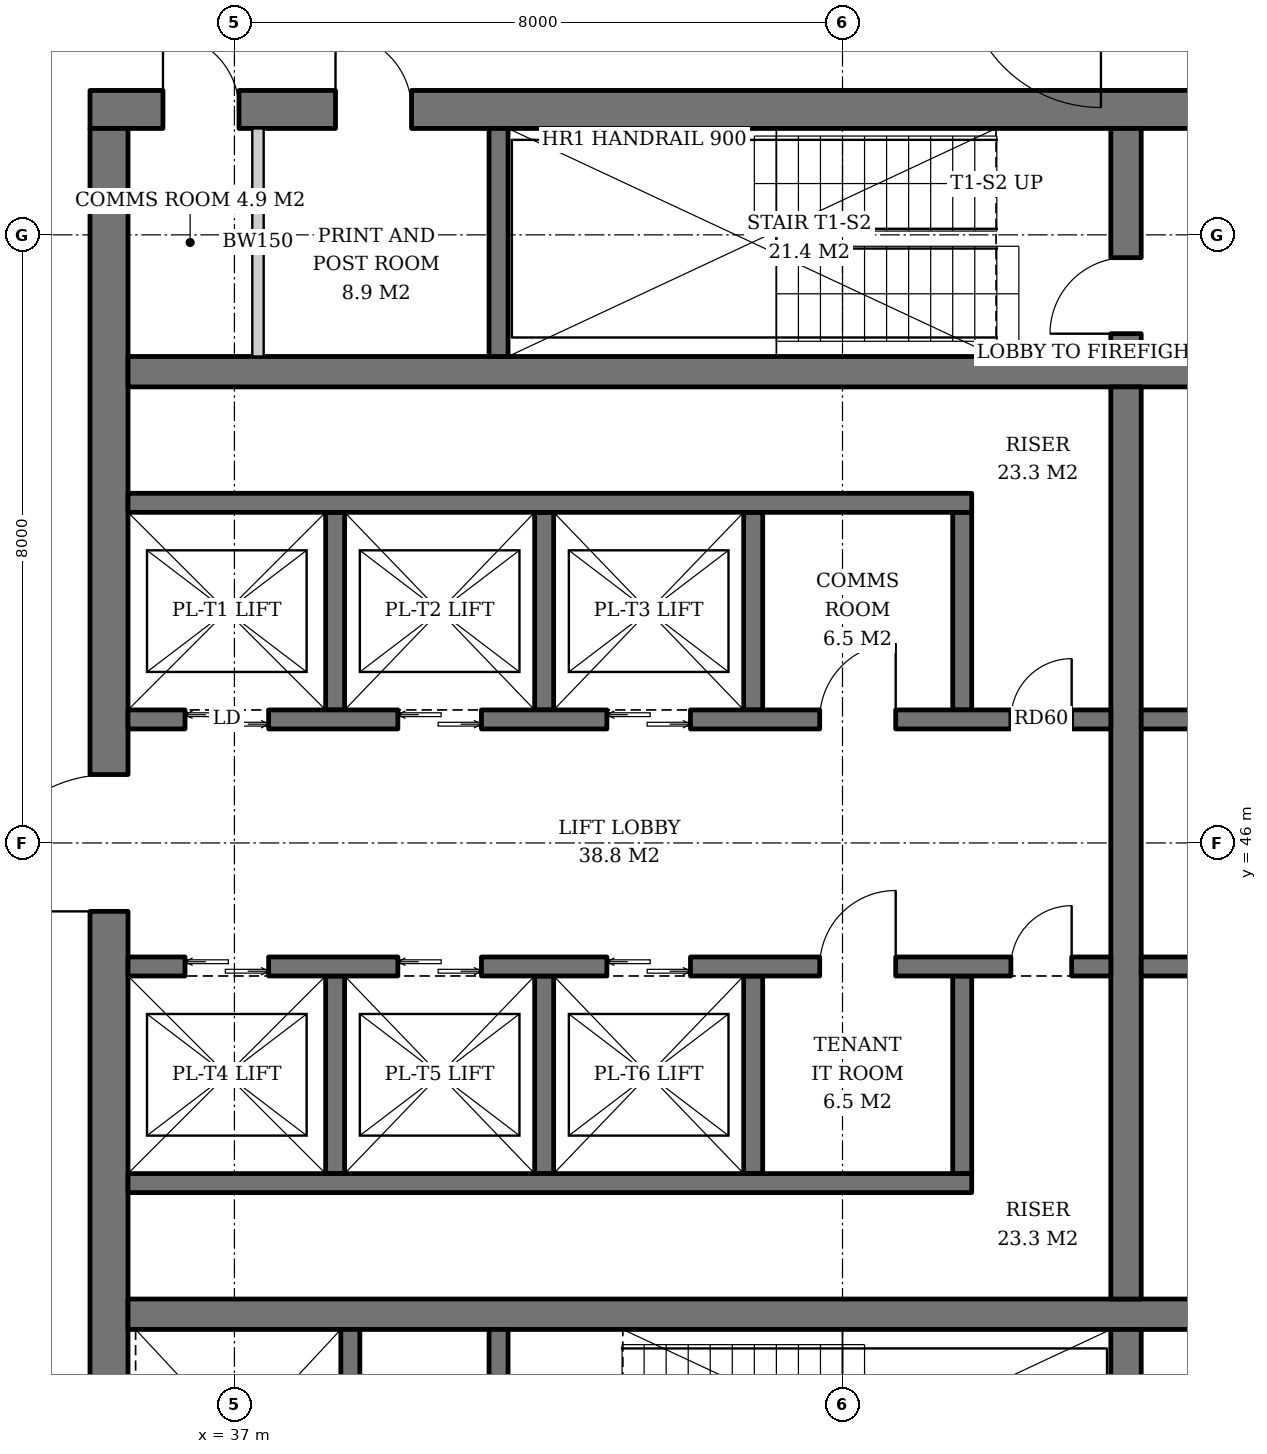
"""IFC4 building model, lengths in metres.
Left out: names, types, materials, properties, quantities, classifications, styles, units other than length and angle.
Written with IfcOpenShell. Run it as: python <this file> out.ifc"""

import sys

from ifc_helpers import new_model, si_unit, direction, frame, frame_2d, origin, place, context, subcontext, project, spatial, rectangle, extrude, element, fill, save


model = new_model("IFC4")
c1 = context("Model", 3, precision=1e-05, world=origin(), true_north=direction((0.0, 1.0)))
c2 = subcontext(c1, "Body", "Model", "MODEL_VIEW")
j1 = project(units=[si_unit("LENGTHUNIT", "METRE"), si_unit("PLANEANGLEUNIT", "RADIAN")], contexts=[c1])
p1 = place(None, origin())
s1 = spatial("IfcSite", under=j1, at=p1, CompositionType="ELEMENT")
p2 = place(p1, origin())
s2 = spatial("IfcBuilding", under=s1, at=p2, CompositionType="ELEMENT")
p3 = place(p2, frame((0.0, 0.0, 245.2)))
s3 = spatial("IfcBuildingStorey", under=s2, at=p3, CompositionType="ELEMENT", Elevation=245.2)
p4 = place(p3, frame((35.1, 55.65, 0.0), z_axis=(0.0, 0.0, 1.0), x_axis=(1.0, 0.0, 0.0)))
e1 = element("IfcWall", 1, at=p4, inside=s3, PredefinedType="SHEAR", context=c2, shape_type="SweptSolid", body=[
    extrude(rectangle(XDim=19.8, YDim=0.5, at=frame_2d((9.9, 0.0))), origin(), (0.0, 0.0, 1.0), 3.8),
])
p5 = place(p4, frame((14.54, 0.0, 0.0)))
e2 = element("IfcOpeningElement", 2, at=p5, cuts=e1, PredefinedType="OPENING", context=c2, shape_type="SweptSolid", body=[
    extrude(rectangle(XDim=1.0, YDim=2.1, at=frame_2d((0.5, 1.05))), frame((0.0, 0.26, 0.0), z_axis=(0.0, -1.0, 0.0), x_axis=(1.0, 0.0, 0.0)), (0.0, 0.0, 1.0), 0.52),
])
p6 = place(p4, frame((0.96, 0.0, 0.0)))
e3 = element("IfcOpeningElement", 3, at=p6, cuts=e1, PredefinedType="OPENING", context=c2, shape_type="SweptSolid", body=[
    extrude(rectangle(XDim=1.0, YDim=2.1, at=frame_2d((0.5, 1.05))), frame((0.0, 0.26, 0.0), z_axis=(0.0, -1.0, 0.0), x_axis=(1.0, 0.0, 0.0)), (0.0, 0.0, 1.0), 0.52),
])
p7 = place(p4, frame((3.23, 0.0, 0.0)))
e4 = element("IfcOpeningElement", 4, at=p7, cuts=e1, PredefinedType="OPENING", context=c2, shape_type="SweptSolid", body=[
    extrude(rectangle(XDim=1.0, YDim=2.1, at=frame_2d((0.5, 1.05))), frame((0.0, 0.26, 0.0), z_axis=(0.0, -1.0, 0.0), x_axis=(1.0, 0.0, 0.0)), (0.0, 0.0, 1.0), 0.52),
])
p8 = place(p3, frame((35.35, 36.6, 0.0), z_axis=(0.0, 0.0, 1.0), x_axis=(0.0, 1.0, 0.0)))
e5 = element("IfcWall", 5, at=p8, inside=s3, PredefinedType="SHEAR", context=c2, shape_type="SweptSolid", body=[
    extrude(rectangle(XDim=18.8, YDim=0.5, at=frame_2d((9.4, 0.0))), origin(), (0.0, 0.0, 1.0), 3.8),
])
p9 = place(p8, frame((8.5, 0.0, 0.0)))
e6 = element("IfcOpeningElement", 6, at=p9, cuts=e5, PredefinedType="OPENING", context=c2, shape_type="SweptSolid", body=[
    extrude(rectangle(XDim=1.8, YDim=2.4, at=frame_2d((0.9, 1.2))), frame((0.0, 0.26, 0.0), z_axis=(0.0, -1.0, 0.0), x_axis=(1.0, 0.0, 0.0)), (0.0, 0.0, 1.0), 0.52),
])
for number, where, z_axis, x_axis in (
    (7, (35.6, 39.8, 0.0), (0.0, 0.0, 1.0), (1.0, 0.0, 0.0)),
    (8, (35.6, 52.2, 0.0), (0.0, 0.0, 1.0), (1.0, 0.0, 0.0)),
):
    element("IfcWall", number, at=place(p3, frame(where, z_axis=z_axis, x_axis=x_axis)), inside=s3, PredefinedType="SHEAR", context=c2, shape_type="SweptSolid", body=[
        extrude(rectangle(XDim=18.8, YDim=0.4, at=frame_2d((9.4, 0.0))), origin(), (0.0, 0.0, 1.0), 3.8),
    ])
p10 = place(p3, frame((48.73, 36.6, 0.0), z_axis=(0.0, 0.0, 1.0), x_axis=(0.0, 1.0, 0.0)))
e9 = element("IfcWall", 9, at=p10, inside=s3, PredefinedType="SHEAR", context=c2, shape_type="SweptSolid", body=[
    extrude(rectangle(XDim=3.0, YDim=0.4, at=frame_2d((1.5, 0.0))), origin(), (0.0, 0.0, 1.0), 3.8),
])
p11 = place(p3, frame((48.73, 40.0, 0.0), z_axis=(0.0, 0.0, 1.0), x_axis=(0.0, 1.0, 0.0)))
e10 = element("IfcWall", 10, at=p11, inside=s3, PredefinedType="SHEAR", context=c2, shape_type="SweptSolid", body=[
    extrude(rectangle(XDim=12.0, YDim=0.4, at=frame_2d((6.0, 0.0))), origin(), (0.0, 0.0, 1.0), 3.8),
])
p12 = place(p3, frame((48.73, 52.4, 0.0), z_axis=(0.0, 0.0, 1.0), x_axis=(0.0, 1.0, 0.0)))
e11 = element("IfcWall", 11, at=p12, inside=s3, PredefinedType="SHEAR", context=c2, shape_type="SweptSolid", body=[
    extrude(rectangle(XDim=3.0, YDim=0.4, at=frame_2d((1.5, 0.0))), origin(), (0.0, 0.0, 1.0), 3.8),
])
p13 = place(p12, frame((0.3, 0.0, 0.0)))
e12 = element("IfcOpeningElement", 12, at=p13, cuts=e11, PredefinedType="OPENING", context=c2, shape_type="SweptSolid", body=[
    extrude(rectangle(XDim=1.0, YDim=2.1, at=frame_2d((0.5, 1.05))), frame((0.0, 0.21, 0.0), z_axis=(0.0, -1.0, 0.0), x_axis=(1.0, 0.0, 0.0)), (0.0, 0.0, 1.0), 0.42),
])
p14 = place(p3, frame((38.525, 36.6, 0.0), z_axis=(0.0, 0.0, 1.0), x_axis=(0.0, 1.0, 0.0)))
e13 = element("IfcWall", 13, at=p14, inside=s3, PredefinedType="SHEAR", context=c2, shape_type="SweptSolid", body=[
    extrude(rectangle(XDim=3.0, YDim=0.25, at=frame_2d((1.5, 0.0))), origin(), (0.0, 0.0, 1.0), 3.8),
])
p15 = place(p14, frame((0.9, 0.0, 0.0)))
e14 = element("IfcOpeningElement", 14, at=p15, cuts=e13, PredefinedType="OPENING", context=c2, shape_type="SweptSolid", body=[
    extrude(rectangle(XDim=1.3, YDim=2.2, at=frame_2d((0.65, 1.1))), frame((0.0, 0.135, 0.0), z_axis=(0.0, -1.0, 0.0), x_axis=(1.0, 0.0, 0.0)), (0.0, 0.0, 1.0), 0.27),
])
p16 = place(p3, frame((40.475, 36.6, 0.0), z_axis=(0.0, 0.0, 1.0), x_axis=(0.0, 1.0, 0.0)))
e15 = element("IfcWall", 15, at=p16, inside=s3, PredefinedType="SHEAR", context=c2, shape_type="SweptSolid", body=[
    extrude(rectangle(XDim=3.0, YDim=0.25, at=frame_2d((1.5, 0.0))), origin(), (0.0, 0.0, 1.0), 3.8),
])
p17 = place(p16, frame((0.85, 0.0, 0.0)))
e16 = element("IfcOpeningElement", 16, at=p17, cuts=e15, PredefinedType="OPENING", context=c2, shape_type="SweptSolid", body=[
    extrude(rectangle(XDim=1.2, YDim=2.1, at=frame_2d((0.6, 1.05))), frame((0.0, 0.135, 0.0), z_axis=(0.0, -1.0, 0.0), x_axis=(1.0, 0.0, 0.0)), (0.0, 0.0, 1.0), 0.27),
])
p18 = place(p3, frame((40.475, 52.4, 0.0), z_axis=(0.0, 0.0, 1.0), x_axis=(0.0, 1.0, 0.0)))
e17 = element("IfcWall", 17, at=p18, inside=s3, PredefinedType="SHEAR", context=c2, shape_type="SweptSolid", body=[
    extrude(rectangle(XDim=3.0, YDim=0.25, at=frame_2d((1.5, 0.0))), origin(), (0.0, 0.0, 1.0), 3.8),
])
for number, where, z_axis, x_axis in (
    (18, (38.325, 47.75, 0.0), (0.0, 0.0, 1.0), (0.0, 1.0, 0.0)),
    (19, (41.075, 47.75, 0.0), (0.0, 0.0, 1.0), (0.0, 1.0, 0.0)),
    (20, (43.825, 47.75, 0.0), (0.0, 0.0, 1.0), (0.0, 1.0, 0.0)),
    (21, (46.575, 47.75, 0.0), (0.0, 0.0, 1.0), (0.0, 1.0, 0.0)),
):
    element("IfcWall", number, at=place(p3, frame(where, z_axis=z_axis, x_axis=x_axis)), inside=s3, PredefinedType="SHEAR", context=c2, shape_type="SweptSolid", body=[
        extrude(rectangle(XDim=2.6, YDim=0.25, at=frame_2d((1.3, 0.0))), origin(), (0.0, 0.0, 1.0), 3.8),
    ])
p19 = place(p3, frame((35.6, 50.475, 0.0), z_axis=(0.0, 0.0, 1.0), x_axis=(1.0, 0.0, 0.0)))
e22 = element("IfcWall", 22, at=p19, inside=s3, PredefinedType="SHEAR", context=c2, shape_type="SweptSolid", body=[
    extrude(rectangle(XDim=11.1, YDim=0.25, at=frame_2d((5.55, 0.0))), origin(), (0.0, 0.0, 1.0), 3.8),
])
p20 = place(p3, frame((35.6, 47.625, 0.0), z_axis=(0.0, 0.0, 1.0), x_axis=(1.0, 0.0, 0.0)))
e23 = element("IfcWall", 23, at=p20, inside=s3, PredefinedType="SHEAR", context=c2, shape_type="SweptSolid", body=[
    extrude(rectangle(XDim=12.93, YDim=0.25, at=frame_2d((6.465, 0.0))), origin(), (0.0, 0.0, 1.0), 3.8),
])
p21 = place(p20, frame((0.75, 0.0, 0.0)))
e24 = element("IfcOpeningElement", 24, at=p21, cuts=e23, PredefinedType="OPENING", context=c2, shape_type="SweptSolid", body=[
    extrude(rectangle(XDim=1.1, YDim=2.2, at=frame_2d((0.55, 1.1))), frame((0.0, 0.135, 0.0), z_axis=(0.0, -1.0, 0.0), x_axis=(1.0, 0.0, 0.0)), (0.0, 0.0, 1.0), 0.27),
])
p22 = place(p20, frame((3.55, 0.0, 0.0)))
e25 = element("IfcOpeningElement", 25, at=p22, cuts=e23, PredefinedType="OPENING", context=c2, shape_type="SweptSolid", body=[
    extrude(rectangle(XDim=1.1, YDim=2.2, at=frame_2d((0.55, 1.1))), frame((0.0, 0.135, 0.0), z_axis=(0.0, -1.0, 0.0), x_axis=(1.0, 0.0, 0.0)), (0.0, 0.0, 1.0), 0.27),
])
p23 = place(p20, frame((6.3, 0.0, 0.0)))
e26 = element("IfcOpeningElement", 26, at=p23, cuts=e23, PredefinedType="OPENING", context=c2, shape_type="SweptSolid", body=[
    extrude(rectangle(XDim=1.1, YDim=2.2, at=frame_2d((0.55, 1.1))), frame((0.0, 0.135, 0.0), z_axis=(0.0, -1.0, 0.0), x_axis=(1.0, 0.0, 0.0)), (0.0, 0.0, 1.0), 0.27),
])
p24 = place(p20, frame((9.1, 0.0, 0.0)))
e27 = element("IfcOpeningElement", 27, at=p24, cuts=e23, PredefinedType="OPENING", context=c2, shape_type="SweptSolid", body=[
    extrude(rectangle(XDim=1.0, YDim=2.1, at=frame_2d((0.5, 1.05))), frame((0.0, 0.135, 0.0), z_axis=(0.0, -1.0, 0.0), x_axis=(1.0, 0.0, 0.0)), (0.0, 0.0, 1.0), 0.27),
])
p25 = place(p20, frame((11.615, 0.0, 0.0)))
e28 = element("IfcOpeningElement", 28, at=p25, cuts=e23, PredefinedType="OPENING", context=c2, shape_type="SweptSolid", body=[
    extrude(rectangle(XDim=0.8, YDim=2.0, at=frame_2d((0.4, 1.0))), frame((0.0, 0.135, 0.0), z_axis=(0.0, -1.0, 0.0), x_axis=(1.0, 0.0, 0.0)), (0.0, 0.0, 1.0), 0.27),
])
for number, where, z_axis, x_axis in (
    (29, (38.325, 44.25, 0.0), (0.0, 0.0, 1.0), (0.0, -1.0, 0.0)),
    (30, (41.075, 44.25, 0.0), (0.0, 0.0, 1.0), (0.0, -1.0, 0.0)),
    (31, (43.825, 44.25, 0.0), (0.0, 0.0, 1.0), (0.0, -1.0, 0.0)),
    (32, (46.575, 44.25, 0.0), (0.0, 0.0, 1.0), (0.0, -1.0, 0.0)),
):
    element("IfcWall", number, at=place(p3, frame(where, z_axis=z_axis, x_axis=x_axis)), inside=s3, PredefinedType="SHEAR", context=c2, shape_type="SweptSolid", body=[
        extrude(rectangle(XDim=2.6, YDim=0.25, at=frame_2d((1.3, 0.0))), origin(), (0.0, 0.0, 1.0), 3.8),
    ])
p26 = place(p3, frame((35.6, 41.525, 0.0), z_axis=(0.0, 0.0, 1.0), x_axis=(1.0, 0.0, 0.0)))
e33 = element("IfcWall", 33, at=p26, inside=s3, PredefinedType="SHEAR", context=c2, shape_type="SweptSolid", body=[
    extrude(rectangle(XDim=11.1, YDim=0.25, at=frame_2d((5.55, 0.0))), origin(), (0.0, 0.0, 1.0), 3.8),
])
p27 = place(p3, frame((35.6, 44.375, 0.0), z_axis=(0.0, 0.0, 1.0), x_axis=(1.0, 0.0, 0.0)))
e34 = element("IfcWall", 34, at=p27, inside=s3, PredefinedType="SHEAR", context=c2, shape_type="SweptSolid", body=[
    extrude(rectangle(XDim=12.93, YDim=0.25, at=frame_2d((6.465, 0.0))), origin(), (0.0, 0.0, 1.0), 3.8),
])
p28 = place(p27, frame((0.75, 0.0, 0.0)))
e35 = element("IfcOpeningElement", 35, at=p28, cuts=e34, PredefinedType="OPENING", context=c2, shape_type="SweptSolid", body=[
    extrude(rectangle(XDim=1.1, YDim=2.2, at=frame_2d((0.55, 1.1))), frame((0.0, 0.135, 0.0), z_axis=(0.0, -1.0, 0.0), x_axis=(1.0, 0.0, 0.0)), (0.0, 0.0, 1.0), 0.27),
])
p29 = place(p27, frame((3.55, 0.0, 0.0)))
e36 = element("IfcOpeningElement", 36, at=p29, cuts=e34, PredefinedType="OPENING", context=c2, shape_type="SweptSolid", body=[
    extrude(rectangle(XDim=1.1, YDim=2.2, at=frame_2d((0.55, 1.1))), frame((0.0, 0.135, 0.0), z_axis=(0.0, -1.0, 0.0), x_axis=(1.0, 0.0, 0.0)), (0.0, 0.0, 1.0), 0.27),
])
p30 = place(p27, frame((6.3, 0.0, 0.0)))
e37 = element("IfcOpeningElement", 37, at=p30, cuts=e34, PredefinedType="OPENING", context=c2, shape_type="SweptSolid", body=[
    extrude(rectangle(XDim=1.1, YDim=2.2, at=frame_2d((0.55, 1.1))), frame((0.0, 0.135, 0.0), z_axis=(0.0, -1.0, 0.0), x_axis=(1.0, 0.0, 0.0)), (0.0, 0.0, 1.0), 0.27),
])
p31 = place(p27, frame((9.1, 0.0, 0.0)))
e38 = element("IfcOpeningElement", 38, at=p31, cuts=e34, PredefinedType="OPENING", context=c2, shape_type="SweptSolid", body=[
    extrude(rectangle(XDim=1.0, YDim=2.1, at=frame_2d((0.5, 1.05))), frame((0.0, 0.135, 0.0), z_axis=(0.0, -1.0, 0.0), x_axis=(1.0, 0.0, 0.0)), (0.0, 0.0, 1.0), 0.27),
])
p32 = place(p27, frame((11.615, 0.0, 0.0)))
e39 = element("IfcOpeningElement", 39, at=p32, cuts=e34, PredefinedType="OPENING", context=c2, shape_type="SweptSolid", body=[
    extrude(rectangle(XDim=0.8, YDim=2.0, at=frame_2d((0.4, 1.0))), frame((0.0, 0.135, 0.0), z_axis=(0.0, -1.0, 0.0), x_axis=(1.0, 0.0, 0.0)), (0.0, 0.0, 1.0), 0.27),
])
p33 = place(p3, frame((48.93, 47.625, 0.0), z_axis=(0.0, 0.0, 1.0), x_axis=(1.0, 0.0, 0.0)))
e40 = element("IfcWall", 40, at=p33, inside=s3, PredefinedType="SHEAR", context=c2, shape_type="SweptSolid", body=[
    extrude(rectangle(XDim=5.47, YDim=0.25, at=frame_2d((2.735, 0.0))), origin(), (0.0, 0.0, 1.0), 3.8),
])
p34 = place(p33, frame((0.78, 0.0, 0.0)))
e41 = element("IfcOpeningElement", 41, at=p34, cuts=e40, PredefinedType="OPENING", context=c2, shape_type="SweptSolid", body=[
    extrude(rectangle(XDim=1.0, YDim=2.1, at=frame_2d((0.5, 1.05))), frame((0.0, 0.135, 0.0), z_axis=(0.0, -1.0, 0.0), x_axis=(1.0, 0.0, 0.0)), (0.0, 0.0, 1.0), 0.27),
])
p35 = place(p33, frame((3.64, 0.0, 0.0)))
e42 = element("IfcOpeningElement", 42, at=p35, cuts=e40, PredefinedType="OPENING", context=c2, shape_type="SweptSolid", body=[
    extrude(rectangle(XDim=1.0, YDim=2.1, at=frame_2d((0.5, 1.05))), frame((0.0, 0.135, 0.0), z_axis=(0.0, -1.0, 0.0), x_axis=(1.0, 0.0, 0.0)), (0.0, 0.0, 1.0), 0.27),
])
p36 = place(p3, frame((48.93, 44.375, 0.0), z_axis=(0.0, 0.0, 1.0), x_axis=(1.0, 0.0, 0.0)))
e43 = element("IfcWall", 43, at=p36, inside=s3, PredefinedType="SHEAR", context=c2, shape_type="SweptSolid", body=[
    extrude(rectangle(XDim=5.47, YDim=0.25, at=frame_2d((2.735, 0.0))), origin(), (0.0, 0.0, 1.0), 3.8),
])
p37 = place(p36, frame((0.78, 0.0, 0.0)))
e44 = element("IfcOpeningElement", 44, at=p37, cuts=e43, PredefinedType="OPENING", context=c2, shape_type="SweptSolid", body=[
    extrude(rectangle(XDim=1.0, YDim=2.1, at=frame_2d((0.5, 1.05))), frame((0.0, 0.135, 0.0), z_axis=(0.0, -1.0, 0.0), x_axis=(1.0, 0.0, 0.0)), (0.0, 0.0, 1.0), 0.27),
])
p38 = place(p36, frame((3.64, 0.0, 0.0)))
e45 = element("IfcOpeningElement", 45, at=p38, cuts=e43, PredefinedType="OPENING", context=c2, shape_type="SweptSolid", body=[
    extrude(rectangle(XDim=1.0, YDim=2.1, at=frame_2d((0.5, 1.05))), frame((0.0, 0.135, 0.0), z_axis=(0.0, -1.0, 0.0), x_axis=(1.0, 0.0, 0.0)), (0.0, 0.0, 1.0), 0.27),
])
p39 = place(p3, frame((37.31, 52.4, 0.0), z_axis=(0.0, 0.0, 1.0), x_axis=(0.0, 1.0, 0.0)))
e46 = element("IfcWall", 46, at=p39, inside=s3, PredefinedType="SOLIDWALL", context=c2, shape_type="SweptSolid", body=[
    extrude(rectangle(XDim=3.0, YDim=0.15, at=frame_2d((1.5, 0.0))), origin(), (0.0, 0.0, 1.0), 3.62),
])
p40 = place(p21, origin())
e47 = element("IfcDoor", 47, at=p40, inside=s3, OperationType="DOUBLE_DOOR_SLIDING", PredefinedType="DOOR", context=c2, shape_type="SweptSolid", body=[
    extrude(rectangle(XDim=1.1, YDim=2.2, at=frame_2d((0.55, 1.1))), frame((0.0, 0.025, 0.0), z_axis=(0.0, -1.0, 0.0), x_axis=(1.0, 0.0, 0.0)), (0.0, 0.0, 1.0), 0.05),
])
fill(e24, e47)
p41 = place(p22, origin())
e48 = element("IfcDoor", 48, at=p41, inside=s3, OperationType="DOUBLE_DOOR_SLIDING", PredefinedType="DOOR", context=c2, shape_type="SweptSolid", body=[
    extrude(rectangle(XDim=1.1, YDim=2.2, at=frame_2d((0.55, 1.1))), frame((0.0, 0.025, 0.0), z_axis=(0.0, -1.0, 0.0), x_axis=(1.0, 0.0, 0.0)), (0.0, 0.0, 1.0), 0.05),
])
fill(e25, e48)
p42 = place(p23, origin())
e49 = element("IfcDoor", 49, at=p42, inside=s3, OperationType="DOUBLE_DOOR_SLIDING", PredefinedType="DOOR", context=c2, shape_type="SweptSolid", body=[
    extrude(rectangle(XDim=1.1, YDim=2.2, at=frame_2d((0.55, 1.1))), frame((0.0, 0.025, 0.0), z_axis=(0.0, -1.0, 0.0), x_axis=(1.0, 0.0, 0.0)), (0.0, 0.0, 1.0), 0.05),
])
fill(e26, e49)
p43 = place(p24, origin())
e50 = element("IfcDoor", 50, at=p43, inside=s3, OperationType="SINGLE_SWING_RIGHT", PredefinedType="DOOR", context=c2, shape_type="SweptSolid", body=[
    extrude(rectangle(XDim=1.0, YDim=2.1, at=frame_2d((0.5, 1.05))), frame((0.0, 0.025, 0.0), z_axis=(0.0, -1.0, 0.0), x_axis=(1.0, 0.0, 0.0)), (0.0, 0.0, 1.0), 0.05),
])
fill(e27, e50)
p44 = place(p25, origin())
e51 = element("IfcDoor", 51, at=p44, inside=s3, OperationType="SINGLE_SWING_RIGHT", PredefinedType="DOOR", context=c2, shape_type="SweptSolid", body=[
    extrude(rectangle(XDim=0.8, YDim=2.0, at=frame_2d((0.4, 1.0))), frame((0.0, 0.025, 0.0), z_axis=(0.0, -1.0, 0.0), x_axis=(1.0, 0.0, 0.0)), (0.0, 0.0, 1.0), 0.05),
])
fill(e28, e51)
p45 = place(p28, origin())
e52 = element("IfcDoor", 52, at=p45, inside=s3, OperationType="DOUBLE_DOOR_SLIDING", PredefinedType="DOOR", context=c2, shape_type="SweptSolid", body=[
    extrude(rectangle(XDim=1.1, YDim=2.2, at=frame_2d((0.55, 1.1))), frame((0.0, 0.025, 0.0), z_axis=(0.0, -1.0, 0.0), x_axis=(1.0, 0.0, 0.0)), (0.0, 0.0, 1.0), 0.05),
])
fill(e35, e52)
p46 = place(p29, origin())
e53 = element("IfcDoor", 53, at=p46, inside=s3, OperationType="DOUBLE_DOOR_SLIDING", PredefinedType="DOOR", context=c2, shape_type="SweptSolid", body=[
    extrude(rectangle(XDim=1.1, YDim=2.2, at=frame_2d((0.55, 1.1))), frame((0.0, 0.025, 0.0), z_axis=(0.0, -1.0, 0.0), x_axis=(1.0, 0.0, 0.0)), (0.0, 0.0, 1.0), 0.05),
])
fill(e36, e53)
p47 = place(p30, origin())
e54 = element("IfcDoor", 54, at=p47, inside=s3, OperationType="DOUBLE_DOOR_SLIDING", PredefinedType="DOOR", context=c2, shape_type="SweptSolid", body=[
    extrude(rectangle(XDim=1.1, YDim=2.2, at=frame_2d((0.55, 1.1))), frame((0.0, 0.025, 0.0), z_axis=(0.0, -1.0, 0.0), x_axis=(1.0, 0.0, 0.0)), (0.0, 0.0, 1.0), 0.05),
])
fill(e37, e54)
p48 = place(p31, origin())
e55 = element("IfcDoor", 55, at=p48, inside=s3, OperationType="SINGLE_SWING_RIGHT", PredefinedType="DOOR", context=c2, shape_type="SweptSolid", body=[
    extrude(rectangle(XDim=1.0, YDim=2.1, at=frame_2d((0.5, 1.05))), frame((0.0, 0.025, 0.0), z_axis=(0.0, -1.0, 0.0), x_axis=(1.0, 0.0, 0.0)), (0.0, 0.0, 1.0), 0.05),
])
fill(e38, e55)
p49 = place(p32, origin())
e56 = element("IfcDoor", 56, at=p49, inside=s3, OperationType="SINGLE_SWING_RIGHT", PredefinedType="DOOR", context=c2, shape_type="SweptSolid", body=[
    extrude(rectangle(XDim=0.8, YDim=2.0, at=frame_2d((0.4, 1.0))), frame((0.0, 0.025, 0.0), z_axis=(0.0, -1.0, 0.0), x_axis=(1.0, 0.0, 0.0)), (0.0, 0.0, 1.0), 0.05),
])
fill(e39, e56)
p50 = place(p13, origin())
e57 = element("IfcDoor", 57, at=p50, inside=s3, OperationType="SINGLE_SWING_LEFT", PredefinedType="DOOR", context=c2, shape_type="SweptSolid", body=[
    extrude(rectangle(XDim=1.0, YDim=2.1, at=frame_2d((0.5, 1.05))), frame((0.0, 0.025, 0.0), z_axis=(0.0, -1.0, 0.0), x_axis=(1.0, 0.0, 0.0)), (0.0, 0.0, 1.0), 0.05),
])
fill(e12, e57)
p51 = place(p9, origin())
e58 = element("IfcDoor", 58, at=p51, inside=s3, OperationType="DOUBLE_DOOR_SINGLE_SWING", PredefinedType="DOOR", context=c2, shape_type="SweptSolid", body=[
    extrude(rectangle(XDim=1.8, YDim=2.4, at=frame_2d((0.9, 1.2))), frame((0.0, 0.025, 0.0), z_axis=(0.0, -1.0, 0.0), x_axis=(1.0, 0.0, 0.0)), (0.0, 0.0, 1.0), 0.05),
])
fill(e6, e58)
p52 = place(p6, origin())
e59 = element("IfcDoor", 59, at=p52, inside=s3, OperationType="SINGLE_SWING_LEFT", PredefinedType="DOOR", context=c2, shape_type="SweptSolid", body=[
    extrude(rectangle(XDim=1.0, YDim=2.1, at=frame_2d((0.5, 1.05))), frame((0.0, -0.19, 0.0), z_axis=(0.0, -1.0, 0.0), x_axis=(1.0, 0.0, 0.0)), (0.0, 0.0, 1.0), 0.05),
])
fill(e3, e59)
p53 = place(p7, origin())
e60 = element("IfcDoor", 60, at=p53, inside=s3, OperationType="SINGLE_SWING_LEFT", PredefinedType="DOOR", context=c2, shape_type="SweptSolid", body=[
    extrude(rectangle(XDim=1.0, YDim=2.1, at=frame_2d((0.5, 1.05))), frame((0.0, -0.19, 0.0), z_axis=(0.0, -1.0, 0.0), x_axis=(1.0, 0.0, 0.0)), (0.0, 0.0, 1.0), 0.05),
])
fill(e4, e60)
save(model, sys.argv[1])
